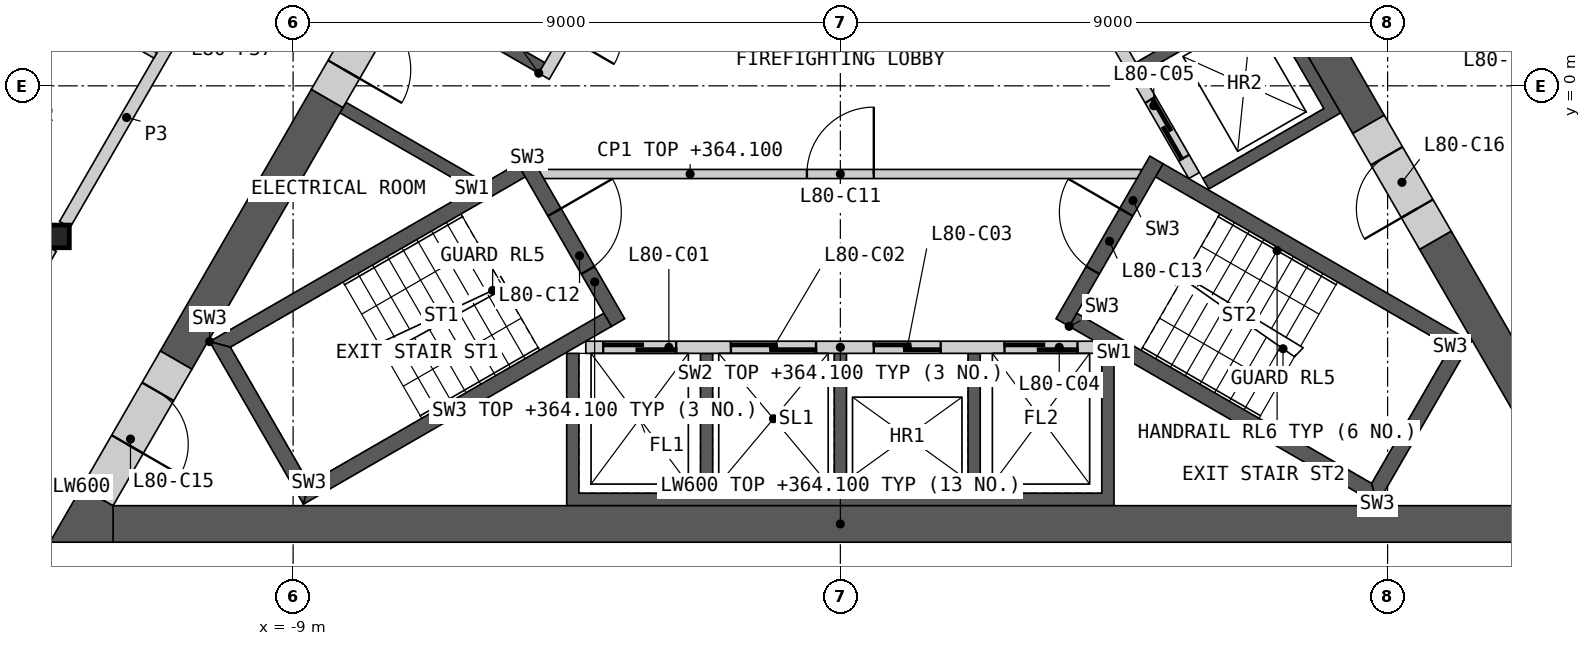
"""IFC4 building model, lengths in metres.
Left out: names, types, materials, properties, quantities, classifications, styles, units other than length and angle.
Written with IfcOpenShell. Run it as: python <this file> out.ifc"""

import sys

from ifc_helpers import new_model, si_unit, direction, frame, frame_2d, origin, origin_2d, place, context, subcontext, project, spatial, polyline, rectangle, i_section, outline, extrude, element, fill, save


model = new_model("IFC4")
c1 = context("Model", 3, precision=1e-05, world=origin(), true_north=direction((0.0, 1.0)))
c2 = subcontext(c1, "Body", "Model", "MODEL_VIEW")
j1 = project(units=[si_unit("LENGTHUNIT", "METRE"), si_unit("PLANEANGLEUNIT", "RADIAN")], contexts=[c1])
p1 = place(None, origin())
s1 = spatial("IfcSite", under=j1, at=p1, CompositionType="ELEMENT")
p2 = place(p1, origin())
s2 = spatial("IfcBuilding", under=s1, at=p2, CompositionType="ELEMENT")
p3 = place(p2, frame((0.0, 0.0, 361.0)))
s3 = spatial("IfcBuildingStorey", under=s2, at=p3, CompositionType="ELEMENT", Elevation=361.0)
p4 = place(p3, frame((-12.868, -2.476, 0.0), z_axis=(0.0, 0.0, 1.0), x_axis=(1.0, 0.0, 0.0)))
e1 = element("IfcColumn", 1, at=p4, inside=s3, PredefinedType="COLUMN", context=c2, shape_type="SweptSolid", body=[
    extrude(i_section(OverallWidth=0.374, OverallDepth=0.372, WebThickness=0.016, FlangeThickness=0.026, at=origin_2d()), origin(), (0.0, 0.0, 1.0), 3.4),
])
p5 = place(p3, origin())
e2 = element("IfcWall", 2, at=p5, inside=s3, PredefinedType="SHEAR", context=c2, shape_type="SweptSolid", body=[
    extrude(outline(polyline([(4.5, -4.4), (4.5, -6.906), (-4.5, -6.906), (-4.5, -4.4), (-4.3, -4.4), (-4.3, -6.7), (-2.3, -6.7), (-2.3, -4.4), (-2.1, -4.4), (-2.1, -6.7), (-0.1, -6.7), (-0.1, -4.4), (0.1, -4.4), (0.1, -6.7), (2.1, -6.7), (2.1, -4.4), (2.3, -4.4), (2.3, -6.7), (4.3, -6.7), (4.3, -4.4), (4.5, -4.4)])), origin(), (0.0, 0.0, 1.0), 3.1),
])
p6 = place(p3, frame((-4.187, -4.3, 0.0), z_axis=(0.0, 0.0, 1.0), x_axis=(1.0, 0.0, 0.0)))
e3 = element("IfcWall", 3, at=p6, inside=s3, PredefinedType="SOLIDWALL", context=c2, shape_type="SweptSolid", body=[
    extrude(rectangle(XDim=8.373, YDim=0.2, at=frame_2d((4.187, 0.0))), origin(), (0.0, 0.0, 1.0), 3.1),
])
p7 = place(p6, frame((0.287, 0.0, 0.0)))
e4 = element("IfcOpeningElement", 4, at=p7, cuts=e3, PredefinedType="OPENING", context=c2, shape_type="SweptSolid", body=[
    extrude(rectangle(XDim=1.2, YDim=2.1, at=frame_2d((0.6, 1.05))), frame((0.0, 0.11, 0.0), z_axis=(0.0, -1.0, 0.0), x_axis=(1.0, 0.0, 0.0)), (0.0, 0.0, 1.0), 0.22),
])
p8 = place(p6, frame((2.387, 0.0, 0.0)))
e5 = element("IfcOpeningElement", 5, at=p8, cuts=e3, PredefinedType="OPENING", context=c2, shape_type="SweptSolid", body=[
    extrude(rectangle(XDim=1.4, YDim=2.1, at=frame_2d((0.7, 1.05))), frame((0.0, 0.11, 0.0), z_axis=(0.0, -1.0, 0.0), x_axis=(1.0, 0.0, 0.0)), (0.0, 0.0, 1.0), 0.22),
])
p9 = place(p6, frame((4.737, 0.0, 0.0)))
e6 = element("IfcOpeningElement", 6, at=p9, cuts=e3, PredefinedType="OPENING", context=c2, shape_type="SweptSolid", body=[
    extrude(rectangle(XDim=1.1, YDim=2.1, at=frame_2d((0.55, 1.05))), frame((0.0, 0.11, 0.0), z_axis=(0.0, -1.0, 0.0), x_axis=(1.0, 0.0, 0.0)), (0.0, 0.0, 1.0), 0.22),
])
p10 = place(p6, frame((6.887, 0.0, 0.0)))
e7 = element("IfcOpeningElement", 7, at=p10, cuts=e3, PredefinedType="OPENING", context=c2, shape_type="SweptSolid", body=[
    extrude(rectangle(XDim=1.2, YDim=2.1, at=frame_2d((0.6, 1.05))), frame((0.0, 0.11, 0.0), z_axis=(0.0, -1.0, 0.0), x_axis=(1.0, 0.0, 0.0)), (0.0, 0.0, 1.0), 0.22),
])
p11 = place(p3, origin())
e8 = element("IfcWall", 8, at=p11, inside=s3, PredefinedType="SHEAR", context=c2, shape_type="SweptSolid", body=[
    extrude(outline(polyline([(1.561, 6.097), (3.731, 7.35), (8.231, -0.444), (6.061, -1.697), (5.96, -1.524), (7.952, -0.374), (6.952, 1.358), (4.96, 0.208), (4.861, 0.381), (6.852, 1.531), (5.852, 3.263), (3.861, 2.113), (3.76, 2.287), (5.752, 3.437), (4.752, 5.169), (2.76, 4.019), (2.66, 4.192), (4.652, 5.342), (3.652, 7.074), (1.66, 5.924), (1.561, 6.097)])), origin(), (0.0, 0.0, 1.0), 3.1),
])
p12 = place(p3, frame((5.817, -1.476, 0.0), z_axis=(0.0, 0.0, 1.0), x_axis=(-0.500002616675, 0.866023893041, 0.0)))
e9 = element("IfcWall", 9, at=p12, inside=s3, PredefinedType="SOLIDWALL", context=c2, shape_type="SweptSolid", body=[
    extrude(rectangle(XDim=8.373, YDim=0.2, at=frame_2d((4.187, 0.0))), origin(), (0.0, 0.0, 1.0), 3.1),
])
p13 = place(p12, frame((0.337, 0.0, 0.0)))
e10 = element("IfcOpeningElement", 10, at=p13, cuts=e9, PredefinedType="OPENING", context=c2, shape_type="SweptSolid", body=[
    extrude(rectangle(XDim=1.1, YDim=2.1, at=frame_2d((0.55, 1.05))), frame((0.0, 0.11, 0.0), z_axis=(0.0, -1.0, 0.0), x_axis=(1.0, 0.0, 0.0)), (0.0, 0.0, 1.0), 0.22),
])
p14 = place(p12, frame((2.537, 0.0, 0.0)))
e11 = element("IfcOpeningElement", 11, at=p14, cuts=e9, PredefinedType="OPENING", context=c2, shape_type="SweptSolid", body=[
    extrude(rectangle(XDim=1.1, YDim=2.1, at=frame_2d((0.55, 1.05))), frame((0.0, 0.11, 0.0), z_axis=(0.0, -1.0, 0.0), x_axis=(1.0, 0.0, 0.0)), (0.0, 0.0, 1.0), 0.22),
])
p15 = place(p12, frame((4.737, 0.0, 0.0)))
e12 = element("IfcOpeningElement", 12, at=p15, cuts=e9, PredefinedType="OPENING", context=c2, shape_type="SweptSolid", body=[
    extrude(rectangle(XDim=1.1, YDim=2.1, at=frame_2d((0.55, 1.05))), frame((0.0, 0.11, 0.0), z_axis=(0.0, -1.0, 0.0), x_axis=(1.0, 0.0, 0.0)), (0.0, 0.0, 1.0), 0.22),
])
p16 = place(p12, frame((7.037, 0.0, 0.0)))
e13 = element("IfcOpeningElement", 13, at=p16, cuts=e9, PredefinedType="OPENING", context=c2, shape_type="SweptSolid", body=[
    extrude(rectangle(XDim=0.9, YDim=2.1, at=frame_2d((0.45, 1.05))), frame((0.0, 0.11, 0.0), z_axis=(0.0, -1.0, 0.0), x_axis=(1.0, 0.0, 0.0)), (0.0, 0.0, 1.0), 0.22),
])
p17 = place(p3, origin())
e14 = element("IfcWall", 14, at=p17, inside=s3, PredefinedType="SHEAR", context=c2, shape_type="SweptSolid", body=[
    extrude(outline(polyline([(-6.061, -1.697), (-8.231, -0.444), (-8.131, -0.271), (-5.96, -1.524), (-6.061, -1.697)])), origin(), (0.0, 0.0, 1.0), 3.1),
])
p18 = place(p3, origin())
e15 = element("IfcWall", 15, at=p18, inside=s3, PredefinedType="SHEAR", context=c2, shape_type="SweptSolid", body=[
    extrude(outline(polyline([(-4.96, 0.208), (-7.131, 1.461), (-3.731, 7.35), (-1.561, 6.097), (-1.66, 5.924), (-3.652, 7.074), (-5.752, 3.437), (-3.76, 2.287), (-3.861, 2.113), (-5.852, 3.263), (-6.852, 1.531), (-4.861, 0.381), (-4.96, 0.208)])), origin(), (0.0, 0.0, 1.0), 3.1),
])
p19 = place(p3, frame((-1.631, 5.776, 0.0), z_axis=(0.0, 0.0, 1.0), x_axis=(-0.499992876559, -0.866029516466, 0.0)))
e16 = element("IfcWall", 16, at=p19, inside=s3, PredefinedType="SOLIDWALL", context=c2, shape_type="SweptSolid", body=[
    extrude(rectangle(XDim=6.486, YDim=0.2, at=frame_2d((3.243, 0.0))), origin(), (0.0, 0.0, 1.0), 3.1),
])
p20 = place(p19, frame((1.537, 0.0, 0.0)))
e17 = element("IfcOpeningElement", 17, at=p20, cuts=e16, PredefinedType="OPENING", context=c2, shape_type="SweptSolid", body=[
    extrude(rectangle(XDim=0.9, YDim=2.1, at=frame_2d((0.45, 1.05))), frame((0.0, 0.11, 0.0), z_axis=(0.0, -1.0, 0.0), x_axis=(1.0, 0.0, 0.0)), (0.0, 0.0, 1.0), 0.22),
])
p21 = place(p19, frame((4.837, 0.0, 0.0)))
e18 = element("IfcOpeningElement", 18, at=p21, cuts=e16, PredefinedType="OPENING", context=c2, shape_type="SweptSolid", body=[
    extrude(rectangle(XDim=0.9, YDim=2.1, at=frame_2d((0.45, 1.05))), frame((0.0, 0.11, 0.0), z_axis=(0.0, -1.0, 0.0), x_axis=(1.0, 0.0, 0.0)), (0.0, 0.0, 1.0), 0.22),
])
p22 = place(p3, frame((-4.941, -1.45, 0.0), z_axis=(0.0, 0.0, 1.0), x_axis=(1.0, 0.0, 0.0)))
e19 = element("IfcWall", 19, at=p22, inside=s3, PredefinedType="PARTITIONING", context=c2, shape_type="SweptSolid", body=[
    extrude(rectangle(XDim=9.882, YDim=0.15, at=frame_2d((4.941, 0.0))), origin(), (0.0, 0.0, 1.0), 3.1),
])
p23 = place(p22, frame((4.391, 0.0, 0.0)))
e20 = element("IfcOpeningElement", 20, at=p23, cuts=e19, PredefinedType="OPENING", context=c2, shape_type="SweptSolid", body=[
    extrude(rectangle(XDim=1.1, YDim=2.1, at=frame_2d((0.55, 1.05))), frame((0.0, 0.085, 0.0), z_axis=(0.0, -1.0, 0.0), x_axis=(1.0, 0.0, 0.0)), (0.0, 0.0, 1.0), 0.17),
])
p24 = place(p3, origin())
e21 = element("IfcWall", 21, at=p24, inside=s3, PredefinedType="SHEAR", context=c2, shape_type="SweptSolid", body=[
    extrude(outline(polyline([(-5.307, -1.281), (-10.374, -4.206), (-10.032, -4.298), (-5.182, -1.498), (-5.307, -1.281)])), origin(), (0.0, 0.0, 1.0), 3.1),
])
p25 = place(p3, origin())
e22 = element("IfcWall", 22, at=p25, inside=s3, PredefinedType="SHEAR", context=c2, shape_type="SweptSolid", body=[
    extrude(outline(polyline([(-10.374, -4.206), (-8.83, -6.881), (-8.738, -6.539), (-10.032, -4.298), (-10.374, -4.206)])), origin(), (0.0, 0.0, 1.0), 3.1),
])
p26 = place(p3, origin())
e23 = element("IfcWall", 23, at=p26, inside=s3, PredefinedType="SHEAR", context=c2, shape_type="SweptSolid", body=[
    extrude(outline(polyline([(-8.738, -6.539), (-8.83, -6.881), (-3.763, -3.956), (-3.888, -3.739), (-8.738, -6.539)])), origin(), (0.0, 0.0, 1.0), 3.1),
])
p27 = place(p3, frame((-5.199, -1.219, 0.0), z_axis=(0.0, 0.0, 1.0), x_axis=(0.499982516597, -0.866035497597, 0.0)))
e24 = element("IfcWall", 24, at=p27, inside=s3, PredefinedType="SHEAR", context=c2, shape_type="SweptSolid", body=[
    extrude(rectangle(XDim=3.088, YDim=0.25, at=frame_2d((1.544, 0.0))), origin(), (0.0, 0.0, 1.0), 3.1),
])
p28 = place(p27, frame((0.994, 0.0, 0.0)))
e25 = element("IfcOpeningElement", 25, at=p28, cuts=e24, PredefinedType="OPENING", context=c2, shape_type="SweptSolid", body=[
    extrude(rectangle(XDim=1.1, YDim=2.1, at=frame_2d((0.55, 1.05))), frame((0.0, 0.135, 0.0), z_axis=(0.0, -1.0, 0.0), x_axis=(1.0, 0.0, 0.0)), (0.0, 0.0, 1.0), 0.27),
])
p29 = place(p3, origin())
e26 = element("IfcWall", 26, at=p29, inside=s3, PredefinedType="SHEAR", context=c2, shape_type="SweptSolid", body=[
    extrude(outline(polyline([(3.763, -3.956), (8.83, -6.881), (8.738, -6.539), (3.888, -3.739), (3.763, -3.956)])), origin(), (0.0, 0.0, 1.0), 3.1),
])
p30 = place(p3, origin())
e27 = element("IfcWall", 27, at=p30, inside=s3, PredefinedType="SHEAR", context=c2, shape_type="SweptSolid", body=[
    extrude(outline(polyline([(8.83, -6.881), (10.374, -4.206), (10.032, -4.298), (8.738, -6.539), (8.83, -6.881)])), origin(), (0.0, 0.0, 1.0), 3.1),
])
p31 = place(p3, origin())
e28 = element("IfcWall", 28, at=p31, inside=s3, PredefinedType="SHEAR", context=c2, shape_type="SweptSolid", body=[
    extrude(outline(polyline([(10.032, -4.298), (10.374, -4.206), (5.307, -1.281), (5.182, -1.498), (10.032, -4.298)])), origin(), (0.0, 0.0, 1.0), 3.1),
])
p32 = place(p3, frame((3.655, -3.893, 0.0), z_axis=(0.0, 0.0, 1.0), x_axis=(0.499982516597, 0.866035497597, 0.0)))
e29 = element("IfcWall", 29, at=p32, inside=s3, PredefinedType="SHEAR", context=c2, shape_type="SweptSolid", body=[
    extrude(rectangle(XDim=3.088, YDim=0.25, at=frame_2d((1.544, 0.0))), origin(), (0.0, 0.0, 1.0), 3.1),
])
p33 = place(p32, frame((0.994, 0.0, 0.0)))
e30 = element("IfcOpeningElement", 30, at=p33, cuts=e29, PredefinedType="OPENING", context=c2, shape_type="SweptSolid", body=[
    extrude(rectangle(XDim=1.1, YDim=2.1, at=frame_2d((0.55, 1.05))), frame((0.0, 0.135, 0.0), z_axis=(0.0, -1.0, 0.0), x_axis=(1.0, 0.0, 0.0)), (0.0, 0.0, 1.0), 0.27),
])
p34 = place(p3, frame((-11.961, -7.206, 0.0), z_axis=(0.0, 0.0, 1.0), x_axis=(1.0, 0.0, 0.0)))
e31 = element("IfcWall", 31, at=p34, inside=s3, PredefinedType="SHEAR", context=c2, shape_type="SweptSolid", body=[
    extrude(rectangle(XDim=23.921, YDim=0.6, at=frame_2d((11.961, 0.0))), origin(), (0.0, 0.0, 1.0), 3.1),
])
p35 = place(p3, frame((8.686, -0.634, 0.0), z_axis=(0.0, 0.0, 1.0), x_axis=(-0.50001836461, 0.866014800712, 0.0)))
e32 = element("IfcWall", 32, at=p35, inside=s3, PredefinedType="SHEAR", context=c2, shape_type="SweptSolid", body=[
    extrude(rectangle(XDim=10.451, YDim=0.6, at=frame_2d((5.225, 0.0))), origin(), (0.0, 0.0, 1.0), 3.1),
])
p36 = place(p3, frame((12.221, -6.756, 0.0), z_axis=(0.0, 0.0, 1.0), x_axis=(-0.50000604952, 0.866021911064, 0.0)))
e33 = element("IfcWall", 33, at=p36, inside=s3, PredefinedType="SHEAR", context=c2, shape_type="SweptSolid", body=[
    extrude(rectangle(XDim=4.869, YDim=0.6, at=frame_2d((2.434, 0.0))), origin(), (0.0, 0.0, 1.0), 3.1),
])
p37 = place(p3, frame((-8.44, -0.208, 0.0), z_axis=(0.0, 0.0, 1.0), x_axis=(-0.500007425856, -0.866021116422, 0.0)))
e34 = element("IfcWall", 34, at=p37, inside=s3, PredefinedType="SHEAR", context=c2, shape_type="SweptSolid", body=[
    extrude(rectangle(XDim=4.969, YDim=0.6, at=frame_2d((2.484, 0.0))), origin(), (0.0, 0.0, 1.0), 3.1),
])
p38 = place(p3, origin())
e35 = element("IfcWall", 35, at=p38, inside=s3, PredefinedType="SHEAR", context=c2, shape_type="SweptSolid", body=[
    extrude(outline(polyline([(-12.48, -6.606), (-11.961, -6.906), (-11.961, -7.506), (-13.0, -7.506), (-12.48, -6.606)])), origin(), (0.0, 0.0, 1.0), 3.1),
])
p39 = place(p3, frame((-10.925, -4.511, 0.0), z_axis=(0.0, 0.0, 1.0), x_axis=(-0.500018667571, -0.866014625789, 0.0)))
e36 = element("IfcWall", 36, at=p39, inside=s3, PredefinedType="SHEAR", context=c2, shape_type="SweptSolid", body=[
    extrude(rectangle(XDim=2.592, YDim=0.6, at=frame_2d((1.296, 0.0))), origin(), (0.0, 0.0, 1.0), 3.1),
])
p40 = place(p39, frame((0.6, 0.0, 0.0)))
e37 = element("IfcOpeningElement", 37, at=p40, cuts=e36, PredefinedType="OPENING", context=c2, shape_type="SweptSolid", body=[
    extrude(rectangle(XDim=1.0, YDim=2.1, at=frame_2d((0.5, 1.05))), frame((0.0, 0.31, 0.0), z_axis=(0.0, -1.0, 0.0), x_axis=(1.0, 0.0, 0.0)), (0.0, 0.0, 1.0), 0.62),
])
p41 = place(p3, frame((9.786, -2.539, 0.0), z_axis=(0.0, 0.0, 1.0), x_axis=(-0.499981787252, 0.866035918664, 0.0)))
e38 = element("IfcWall", 38, at=p41, inside=s3, PredefinedType="SHEAR", context=c2, shape_type="SweptSolid", body=[
    extrude(rectangle(XDim=2.2, YDim=0.6, at=frame_2d((1.1, 0.0))), origin(), (0.0, 0.0, 1.0), 3.1),
])
p42 = place(p41, frame((0.6, 0.0, 0.0)))
e39 = element("IfcOpeningElement", 39, at=p42, cuts=e38, PredefinedType="OPENING", context=c2, shape_type="SweptSolid", body=[
    extrude(rectangle(XDim=1.0, YDim=2.1, at=frame_2d((0.5, 1.05))), frame((0.0, 0.31, 0.0), z_axis=(0.0, -1.0, 0.0), x_axis=(1.0, 0.0, 0.0)), (0.0, 0.0, 1.0), 0.62),
])
p43 = place(p3, frame((-7.34, 1.698, 0.0), z_axis=(0.0, 0.0, 1.0), x_axis=(-0.50002983664, -0.866008176907, 0.0)))
e40 = element("IfcWall", 40, at=p43, inside=s3, PredefinedType="SHEAR", context=c2, shape_type="SweptSolid", body=[
    extrude(rectangle(XDim=2.2, YDim=0.6, at=frame_2d((1.1, 0.0))), origin(), (0.0, 0.0, 1.0), 3.1),
])
p44 = place(p43, frame((0.55, 0.0, 0.0)))
e41 = element("IfcOpeningElement", 41, at=p44, cuts=e40, PredefinedType="OPENING", context=c2, shape_type="SweptSolid", body=[
    extrude(rectangle(XDim=1.1, YDim=2.1, at=frame_2d((0.55, 1.05))), frame((0.0, 0.31, 0.0), z_axis=(0.0, -1.0, 0.0), x_axis=(1.0, 0.0, 0.0)), (0.0, 0.0, 1.0), 0.62),
])
p45 = place(p3, frame((-12.754, -2.279, 0.0), z_axis=(0.0, 0.0, 1.0), x_axis=(0.500001682468, 0.866024432409, 0.0)))
e42 = element("IfcWall", 42, at=p45, inside=s3, PredefinedType="PARTITIONING", context=c2, shape_type="SweptSolid", body=[
    extrude(rectangle(XDim=8.124, YDim=0.2, at=frame_2d((4.062, 0.0))), origin(), (0.0, 0.0, 1.0), 3.1),
])
p46 = place(p45, frame((3.762, 0.0, 0.0)))
e43 = element("IfcOpeningElement", 43, at=p46, cuts=e42, PredefinedType="OPENING", context=c2, shape_type="SweptSolid", body=[
    extrude(rectangle(XDim=1.0, YDim=2.1, at=frame_2d((0.5, 1.05))), frame((0.0, 0.11, 0.0), z_axis=(0.0, -1.0, 0.0), x_axis=(1.0, 0.0, 0.0)), (0.0, 0.0, 1.0), 0.22),
])
p47 = place(p3, frame((8.692, 4.756, 0.0), z_axis=(0.0, 0.0, 1.0), x_axis=(0.500001682468, -0.866024432409, 0.0)))
e44 = element("IfcWall", 44, at=p47, inside=s3, PredefinedType="PARTITIONING", context=c2, shape_type="SweptSolid", body=[
    extrude(rectangle(XDim=8.124, YDim=0.2, at=frame_2d((4.062, 0.0))), origin(), (0.0, 0.0, 1.0), 3.1),
])
p48 = place(p47, frame((3.587, 0.0, 0.0)))
e45 = element("IfcOpeningElement", 45, at=p48, cuts=e44, PredefinedType="OPENING", context=c2, shape_type="SweptSolid", body=[
    extrude(rectangle(XDim=0.95, YDim=2.1, at=frame_2d((0.475, 1.05))), frame((0.0, 0.11, 0.0), z_axis=(0.0, -1.0, 0.0), x_axis=(1.0, 0.0, 0.0)), (0.0, 0.0, 1.0), 0.22),
])
p49 = place(p3, frame((-15.131, -6.397, 0.0), z_axis=(0.0, 0.0, 1.0), x_axis=(0.499986217557, 0.866033360935, 0.0)))
e46 = element("IfcWall", 46, at=p49, inside=s3, PredefinedType="PARTITIONING", context=c2, shape_type="SweptSolid", body=[
    extrude(rectangle(XDim=4.3, YDim=0.2, at=frame_2d((2.15, 0.0))), origin(), (0.0, 0.0, 1.0), 3.1),
])
p50 = place(p3, frame((-17.414, 4.049, 0.0), z_axis=(0.0, 0.0, 1.0), x_axis=(0.866033839264, -0.499985389037, 0.0)))
e47 = element("IfcWall", 47, at=p50, inside=s3, PredefinedType="PARTITIONING", context=c2, shape_type="SweptSolid", body=[
    extrude(rectangle(XDim=7.1, YDim=0.1, at=frame_2d((3.55, 0.0))), origin(), (0.0, 0.0, 1.0), 2.33),
])
p51 = place(p50, frame((1.158, 0.0, 0.0)))
e48 = element("IfcOpeningElement", 48, at=p51, cuts=e47, PredefinedType="OPENING", context=c2, shape_type="SweptSolid", body=[
    extrude(rectangle(XDim=0.95, YDim=2.1, at=frame_2d((0.475, 1.05))), frame((0.0, 0.06, 0.0), z_axis=(0.0, -1.0, 0.0), x_axis=(1.0, 0.0, 0.0)), (0.0, 0.0, 1.0), 0.12),
])
p52 = place(p7, origin())
e49 = element("IfcDoor", 49, at=p52, inside=s3, OperationType="SLIDING_TO_LEFT", PredefinedType="DOOR", context=c2, shape_type="SweptSolid", body=[
    extrude(rectangle(XDim=1.2, YDim=2.1, at=frame_2d((0.6, 1.05))), frame((0.0, 0.025, 0.0), z_axis=(0.0, -1.0, 0.0), x_axis=(1.0, 0.0, 0.0)), (0.0, 0.0, 1.0), 0.05),
])
fill(e4, e49)
p53 = place(p8, origin())
e50 = element("IfcDoor", 50, at=p53, inside=s3, OperationType="SLIDING_TO_LEFT", PredefinedType="DOOR", context=c2, shape_type="SweptSolid", body=[
    extrude(rectangle(XDim=1.4, YDim=2.1, at=frame_2d((0.7, 1.05))), frame((0.0, 0.025, 0.0), z_axis=(0.0, -1.0, 0.0), x_axis=(1.0, 0.0, 0.0)), (0.0, 0.0, 1.0), 0.05),
])
fill(e5, e50)
p54 = place(p9, origin())
e51 = element("IfcDoor", 51, at=p54, inside=s3, OperationType="SLIDING_TO_LEFT", PredefinedType="DOOR", context=c2, shape_type="SweptSolid", body=[
    extrude(rectangle(XDim=1.1, YDim=2.1, at=frame_2d((0.55, 1.05))), frame((0.0, 0.025, 0.0), z_axis=(0.0, -1.0, 0.0), x_axis=(1.0, 0.0, 0.0)), (0.0, 0.0, 1.0), 0.05),
])
fill(e6, e51)
p55 = place(p10, origin())
e52 = element("IfcDoor", 52, at=p55, inside=s3, OperationType="SLIDING_TO_LEFT", PredefinedType="DOOR", context=c2, shape_type="SweptSolid", body=[
    extrude(rectangle(XDim=1.2, YDim=2.1, at=frame_2d((0.6, 1.05))), frame((0.0, 0.025, 0.0), z_axis=(0.0, -1.0, 0.0), x_axis=(1.0, 0.0, 0.0)), (0.0, 0.0, 1.0), 0.05),
])
fill(e7, e52)
p56 = place(p13, origin())
e53 = element("IfcDoor", 53, at=p56, inside=s3, OperationType="SLIDING_TO_LEFT", PredefinedType="DOOR", context=c2, shape_type="SweptSolid", body=[
    extrude(rectangle(XDim=1.1, YDim=2.1, at=frame_2d((0.55, 1.05))), frame((0.0, 0.025, 0.0), z_axis=(0.0, -1.0, 0.0), x_axis=(1.0, 0.0, 0.0)), (0.0, 0.0, 1.0), 0.05),
])
fill(e10, e53)
p57 = place(p23, origin())
e54 = element("IfcDoor", 54, at=p57, inside=s3, OperationType="SINGLE_SWING_RIGHT", PredefinedType="DOOR", context=c2, shape_type="SweptSolid", body=[
    extrude(rectangle(XDim=1.1, YDim=2.1, at=frame_2d((0.55, 1.05))), frame((0.0, 0.025, 0.0), z_axis=(0.0, -1.0, 0.0), x_axis=(1.0, 0.0, 0.0)), (0.0, 0.0, 1.0), 0.05),
])
fill(e20, e54)
p58 = place(p28, origin())
e55 = element("IfcDoor", 55, at=p58, inside=s3, OperationType="SINGLE_SWING_LEFT", PredefinedType="DOOR", context=c2, shape_type="SweptSolid", body=[
    extrude(rectangle(XDim=1.1, YDim=2.1, at=frame_2d((0.55, 1.05))), frame((0.0, 0.025, 0.0), z_axis=(0.0, -1.0, 0.0), x_axis=(1.0, 0.0, 0.0)), (0.0, 0.0, 1.0), 0.05),
])
fill(e25, e55)
p59 = place(p33, origin())
e56 = element("IfcDoor", 56, at=p59, inside=s3, OperationType="SINGLE_SWING_RIGHT", PredefinedType="DOOR", context=c2, shape_type="SweptSolid", body=[
    extrude(rectangle(XDim=1.1, YDim=2.1, at=frame_2d((0.55, 1.05))), frame((0.0, 0.025, 0.0), z_axis=(0.0, -1.0, 0.0), x_axis=(1.0, 0.0, 0.0)), (0.0, 0.0, 1.0), 0.05),
])
fill(e30, e56)
p60 = place(p40, origin())
e57 = element("IfcDoor", 57, at=p60, inside=s3, OperationType="SINGLE_SWING_RIGHT", PredefinedType="DOOR", context=c2, shape_type="SweptSolid", body=[
    extrude(rectangle(XDim=1.0, YDim=2.1, at=frame_2d((0.5, 1.05))), frame((0.0, 0.055, 0.0), z_axis=(0.0, -1.0, 0.0), x_axis=(1.0, 0.0, 0.0)), (0.0, 0.0, 1.0), 0.05),
])
fill(e37, e57)
p61 = place(p42, origin())
e58 = element("IfcDoor", 58, at=p61, inside=s3, OperationType="SINGLE_SWING_LEFT", PredefinedType="DOOR", context=c2, shape_type="SweptSolid", body=[
    extrude(rectangle(XDim=1.0, YDim=2.1, at=frame_2d((0.5, 1.05))), frame((0.0, 0.055, 0.0), z_axis=(0.0, -1.0, 0.0), x_axis=(1.0, 0.0, 0.0)), (0.0, 0.0, 1.0), 0.05),
])
fill(e39, e58)
p62 = place(p44, origin())
e59 = element("IfcDoor", 59, at=p62, inside=s3, OperationType="SINGLE_SWING_RIGHT", PredefinedType="DOOR", context=c2, shape_type="SweptSolid", body=[
    extrude(rectangle(XDim=1.1, YDim=2.1, at=frame_2d((0.55, 1.05))), frame((0.0, 0.055, 0.0), z_axis=(0.0, -1.0, 0.0), x_axis=(1.0, 0.0, 0.0)), (0.0, 0.0, 1.0), 0.05),
])
fill(e41, e59)
save(model, sys.argv[1])
